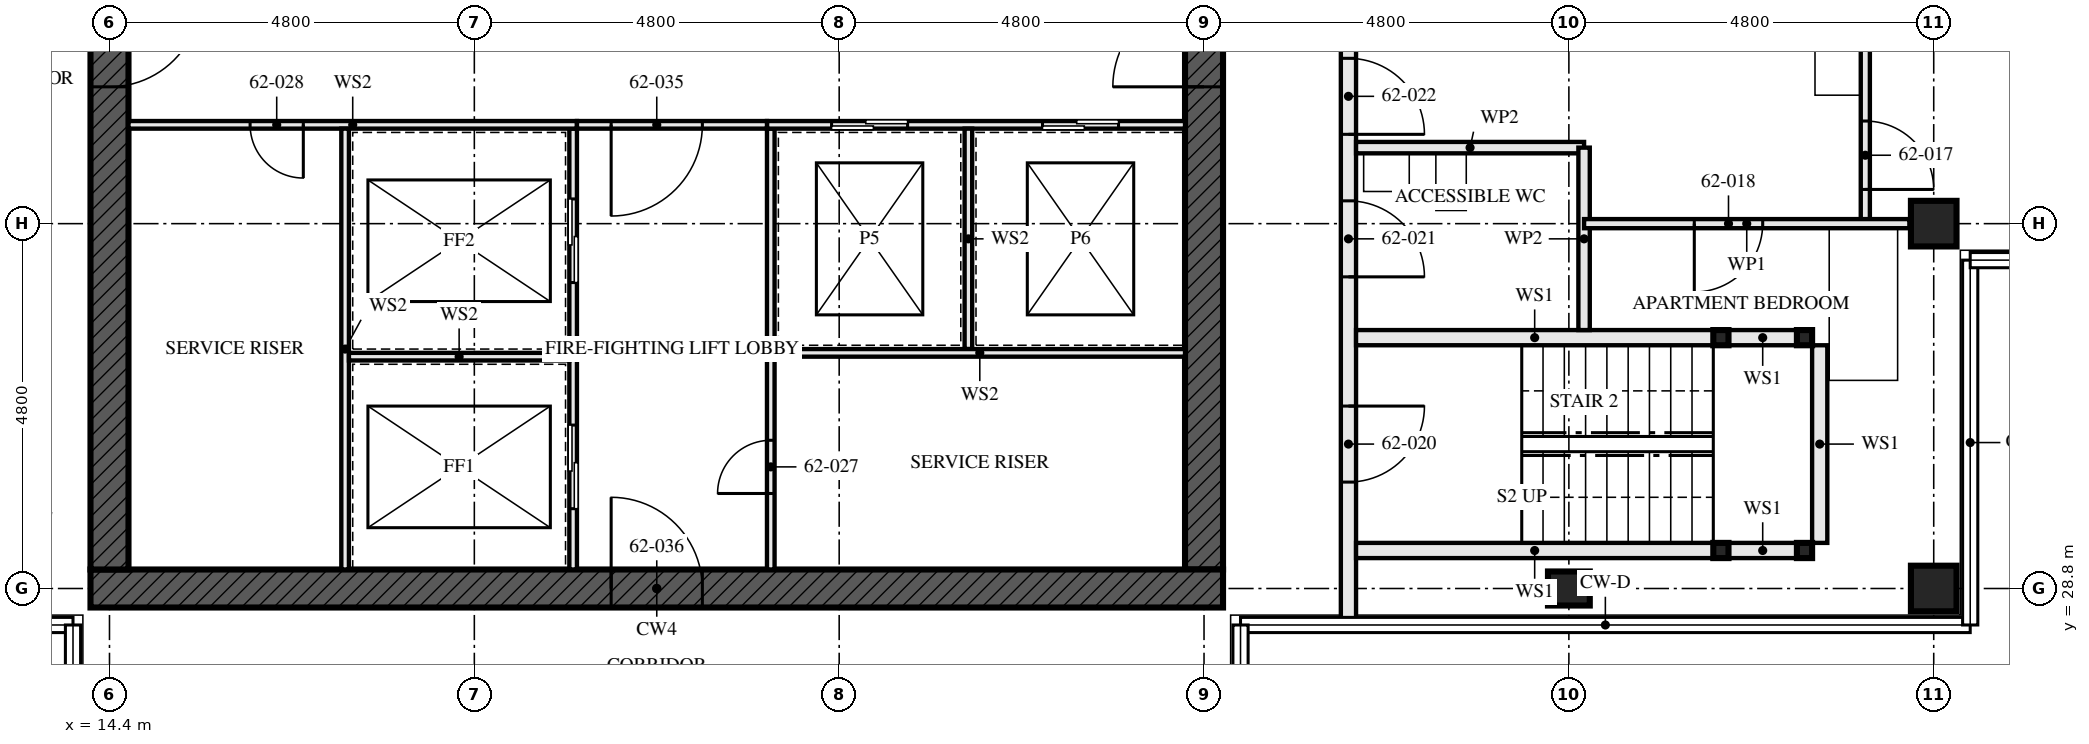
"""IFC4 building model, lengths in metres.
Left out: names, types, materials, properties, quantities, classifications, styles, units other than length and angle.
Written with IfcOpenShell. Run it as: python <this file> out.ifc"""

import sys

from ifc_helpers import new_model, si_unit, direction, frame, frame_2d, origin, origin_2d, place, context, subcontext, project, spatial, rectangle, hollow_rectangle, i_section, extrude, element, fill, save


model = new_model("IFC4")
c1 = context("Model", 3, precision=1e-05, world=origin(), true_north=direction((0.0, 1.0)))
c2 = subcontext(c1, "Body", "Model", "MODEL_VIEW")
j1 = project(units=[si_unit("LENGTHUNIT", "METRE"), si_unit("PLANEANGLEUNIT", "RADIAN")], contexts=[c1])
p1 = place(None, origin())
s1 = spatial("IfcSite", under=j1, at=p1, CompositionType="ELEMENT")
p2 = place(p1, origin())
s2 = spatial("IfcBuilding", under=s1, at=p2, CompositionType="ELEMENT")
p3 = place(p2, frame((0.0, 0.0, 226.0)))
s3 = spatial("IfcBuildingStorey", under=s2, at=p3, CompositionType="ELEMENT", Elevation=226.0)
p4 = place(p3, frame((33.6, 28.8, 0.0), z_axis=(0.0, 0.0, 1.0), x_axis=(0.0, 1.0, 0.0)))
e1 = element("IfcColumn", 1, at=p4, inside=s3, PredefinedType="COLUMN", context=c2, shape_type="SweptSolid", body=[
    extrude(i_section(OverallWidth=0.448, OverallDepth=0.55, WebThickness=0.072, FlangeThickness=0.115, FilletRadius=0.015, at=origin_2d()), origin(), (0.0, 0.0, 1.0), 3.5),
])
for number, where, z_axis, x_axis in (
    (2, (38.4, 28.8, 0.0), (0.0, 0.0, 1.0), (0.0, 1.0, 0.0)),
    (3, (38.4, 33.6, 0.0), (0.0, 0.0, 1.0), (0.0, 1.0, 0.0)),
):
    element("IfcColumn", number, at=place(p3, frame(where, z_axis=z_axis, x_axis=x_axis)), inside=s3, PredefinedType="COLUMN", context=c2, shape_type="SweptSolid", body=[
        extrude(hollow_rectangle(XDim=0.6, YDim=0.6, WallThickness=0.05, at=origin_2d()), origin(), (0.0, 0.0, 1.0), 3.5),
    ])
p5 = place(p3, frame((14.15, 28.8, -0.17), z_axis=(0.0, 0.0, 1.0), x_axis=(1.0, 0.0, 0.0)))
e4 = element("IfcWall", 4, at=p5, inside=s3, PredefinedType="SHEAR", context=c2, shape_type="SweptSolid", body=[
    extrude(rectangle(XDim=14.9, YDim=0.5, at=frame_2d((7.45, 0.0))), origin(), (0.0, 0.0, 1.0), 3.5),
])
p6 = place(p5, frame((6.85, 0.0, 0.17)))
e5 = element("IfcOpeningElement", 5, at=p6, cuts=e4, PredefinedType="OPENING", context=c2, shape_type="SweptSolid", body=[
    extrude(rectangle(XDim=1.2, YDim=2.1, at=frame_2d((0.6, 1.05))), frame((0.0, 0.26, 0.0), z_axis=(0.0, -1.0, 0.0), x_axis=(1.0, 0.0, 0.0)), (0.0, 0.0, 1.0), 0.521),
])
p7 = place(p3, frame((14.4, 42.95, -0.17), z_axis=(0.0, 0.0, 1.0), x_axis=(0.0, -1.0, 0.0)))
e6 = element("IfcWall", 6, at=p7, inside=s3, PredefinedType="SHEAR", context=c2, shape_type="SweptSolid", body=[
    extrude(rectangle(XDim=13.9, YDim=0.5, at=frame_2d((6.95, 0.0))), origin(), (0.0, 0.0, 1.0), 3.5),
])
p8 = place(p7, frame((6.35, 0.0, 0.17)))
e7 = element("IfcOpeningElement", 7, at=p8, cuts=e6, PredefinedType="OPENING", context=c2, shape_type="SweptSolid", body=[
    extrude(rectangle(XDim=1.2, YDim=2.1, at=frame_2d((0.6, 1.05))), frame((0.0, 0.26, 0.0), z_axis=(0.0, -1.0, 0.0), x_axis=(1.0, 0.0, 0.0)), (0.0, 0.0, 1.0), 0.521),
])
p9 = place(p3, frame((28.8, 29.05, -0.17), z_axis=(0.0, 0.0, 1.0), x_axis=(0.0, 1.0, 0.0)))
e8 = element("IfcWall", 8, at=p9, inside=s3, PredefinedType="SHEAR", context=c2, shape_type="SweptSolid", body=[
    extrude(rectangle(XDim=13.9, YDim=0.5, at=frame_2d((6.95, 0.0))), origin(), (0.0, 0.0, 1.0), 3.5),
])
p10 = place(p9, frame((6.35, 0.0, 0.17)))
e9 = element("IfcOpeningElement", 9, at=p10, cuts=e8, PredefinedType="OPENING", context=c2, shape_type="SweptSolid", body=[
    extrude(rectangle(XDim=1.2, YDim=2.1, at=frame_2d((0.6, 1.05))), frame((0.0, 0.26, 0.0), z_axis=(0.0, -1.0, 0.0), x_axis=(1.0, 0.0, 0.0)), (0.0, 0.0, 1.0), 0.521),
])
for number, where, z_axis, x_axis in (
    (10, (36.7, 29.3, 0.0), (0.0, 0.0, 1.0), (1.0, 0.0, 0.0)),
    (11, (36.7, 32.1, 0.0), (0.0, 0.0, 1.0), (1.0, 0.0, 0.0)),
    (12, (35.6, 29.3, 0.0), (0.0, 0.0, 1.0), (1.0, 0.0, 0.0)),
    (13, (35.6, 32.1, 0.0), (0.0, 0.0, 1.0), (1.0, 0.0, 0.0)),
):
    element("IfcColumn", number, at=place(p3, frame(where, z_axis=z_axis, x_axis=x_axis)), inside=s3, PredefinedType="COLUMN", context=c2, shape_type="SweptSolid", body=[
        extrude(hollow_rectangle(XDim=0.2, YDim=0.2, WallThickness=0.008, at=origin_2d()), origin(), (0.0, 0.0, 1.0), 3.33),
    ])
p11 = place(p3, frame((36.6, 29.3, 0.0), z_axis=(0.0, 0.0, 1.0), x_axis=(-1.0, 0.0, 0.0)))
e14 = element("IfcWall", 14, at=p11, inside=s3, PredefinedType="SOLIDWALL", context=c2, shape_type="SweptSolid", body=[
    extrude(rectangle(XDim=0.9, YDim=0.2, at=frame_2d((0.45, 0.0))), origin(), (0.0, 0.0, 1.0), 2.99),
])
p12 = place(p3, frame((35.5, 29.3, 0.0), z_axis=(0.0, 0.0, 1.0), x_axis=(-1.0, 0.0, 0.0)))
e15 = element("IfcWall", 15, at=p12, inside=s3, PredefinedType="SOLIDWALL", context=c2, shape_type="SweptSolid", body=[
    extrude(rectangle(XDim=4.7, YDim=0.2, at=frame_2d((2.35, 0.0))), origin(), (0.0, 0.0, 1.0), 2.99),
])
p13 = place(p3, frame((36.6, 32.1, 0.0), z_axis=(0.0, 0.0, 1.0), x_axis=(-1.0, 0.0, 0.0)))
e16 = element("IfcWall", 16, at=p13, inside=s3, PredefinedType="SOLIDWALL", context=c2, shape_type="SweptSolid", body=[
    extrude(rectangle(XDim=0.9, YDim=0.2, at=frame_2d((0.45, 0.0))), origin(), (0.0, 0.0, 1.0), 2.99),
])
p14 = place(p3, frame((35.5, 32.1, 0.0), z_axis=(0.0, 0.0, 1.0), x_axis=(-1.0, 0.0, 0.0)))
e17 = element("IfcWall", 17, at=p14, inside=s3, PredefinedType="SOLIDWALL", context=c2, shape_type="SweptSolid", body=[
    extrude(rectangle(XDim=4.7, YDim=0.2, at=frame_2d((2.35, 0.0))), origin(), (0.0, 0.0, 1.0), 2.99),
])
p15 = place(p3, frame((36.9, 29.4, 0.0), z_axis=(0.0, 0.0, 1.0), x_axis=(0.0, 1.0, 0.0)))
e18 = element("IfcWall", 18, at=p15, inside=s3, PredefinedType="SOLIDWALL", context=c2, shape_type="SweptSolid", body=[
    extrude(rectangle(XDim=2.6, YDim=0.2, at=frame_2d((1.3, 0.0))), origin(), (0.0, 0.0, 1.0), 3.33),
])
p16 = place(p3, frame((33.8, 32.2, 0.0), z_axis=(0.0, 0.0, 1.0), x_axis=(0.0, 1.0, 0.0)))
e19 = element("IfcWall", 19, at=p16, inside=s3, PredefinedType="PARTITIONING", context=c2, shape_type="SweptSolid", body=[
    extrude(rectangle(XDim=2.4, YDim=0.15, at=frame_2d((1.2, 0.0))), origin(), (0.0, 0.0, 1.0), 2.55),
])
p17 = place(p3, frame((33.8, 34.6, 0.0), z_axis=(0.0, 0.0, 1.0), x_axis=(-1.0, 0.0, 0.0)))
e20 = element("IfcWall", 20, at=p17, inside=s3, PredefinedType="PARTITIONING", context=c2, shape_type="SweptSolid", body=[
    extrude(rectangle(XDim=3.0, YDim=0.15, at=frame_2d((1.5, 0.0))), origin(), (0.0, 0.0, 1.0), 3.33),
])
p18 = place(p3, frame((37.5, 33.6, 0.0), z_axis=(0.0, 0.0, 1.0), x_axis=(0.0, 1.0, 0.0)))
e21 = element("IfcWall", 21, at=p18, inside=s3, PredefinedType="PARTITIONING", context=c2, shape_type="SweptSolid", body=[
    extrude(rectangle(XDim=4.8, YDim=0.12, at=frame_2d((2.4, 0.0))), origin(), (0.0, 0.0, 1.0), 3.33),
])
p19 = place(p18, frame((0.45, 0.0, 0.0)))
e22 = element("IfcOpeningElement", 22, at=p19, cuts=e21, PredefinedType="OPENING", context=c2, shape_type="SweptSolid", body=[
    extrude(rectangle(XDim=0.9, YDim=2.1, at=frame_2d((0.45, 1.05))), frame((0.0, 0.071, 0.0), z_axis=(0.0, -1.0, 0.0), x_axis=(1.0, 0.0, 0.0)), (0.0, 0.0, 1.0), 0.141),
])
p20 = place(p3, frame((38.08, 33.6, 0.0), z_axis=(0.0, 0.0, 1.0), x_axis=(-1.0, 0.0, 0.0)))
e23 = element("IfcWall", 23, at=p20, inside=s3, PredefinedType="PARTITIONING", context=c2, shape_type="SweptSolid", body=[
    extrude(rectangle(XDim=4.28, YDim=0.12, at=frame_2d((2.14, 0.0))), origin(), (0.0, 0.0, 1.0), 2.55),
])
p21 = place(p20, frame((1.93, 0.0, 0.0)))
e24 = element("IfcOpeningElement", 24, at=p21, cuts=e23, PredefinedType="OPENING", context=c2, shape_type="SweptSolid", body=[
    extrude(rectangle(XDim=0.9, YDim=2.1, at=frame_2d((0.45, 1.05))), frame((0.0, 0.071, 0.0), z_axis=(0.0, -1.0, 0.0), x_axis=(1.0, 0.0, 0.0)), (0.0, 0.0, 1.0), 0.141),
])
p22 = place(p3, frame((30.7, 28.345, 0.0), z_axis=(0.0, 0.0, 1.0), x_axis=(0.0, 1.0, 0.0)))
e25 = element("IfcWall", 25, at=p22, inside=s3, PredefinedType="PARTITIONING", context=c2, shape_type="SweptSolid", body=[
    extrude(rectangle(XDim=15.31, YDim=0.2, at=frame_2d((7.655, 0.0))), origin(), (0.0, 0.0, 1.0), 2.32),
])
p23 = place(p22, frame((1.855, 0.0, 0.0)))
e26 = element("IfcOpeningElement", 26, at=p23, cuts=e25, PredefinedType="OPENING", context=c2, shape_type="SweptSolid", body=[
    extrude(rectangle(XDim=1.0, YDim=2.1, at=frame_2d((0.5, 1.05))), frame((0.0, 0.111, 0.0), z_axis=(0.0, -1.0, 0.0), x_axis=(1.0, 0.0, 0.0)), (0.0, 0.0, 1.0), 0.221),
])
p24 = place(p22, frame((4.555, 0.0, 0.0)))
e27 = element("IfcOpeningElement", 27, at=p24, cuts=e25, PredefinedType="OPENING", context=c2, shape_type="SweptSolid", body=[
    extrude(rectangle(XDim=1.0, YDim=2.1, at=frame_2d((0.5, 1.05))), frame((0.0, 0.111, 0.0), z_axis=(0.0, -1.0, 0.0), x_axis=(1.0, 0.0, 0.0)), (0.0, 0.0, 1.0), 0.221),
])
p25 = place(p22, frame((6.43, 0.0, 0.0)))
e28 = element("IfcOpeningElement", 28, at=p25, cuts=e25, PredefinedType="OPENING", context=c2, shape_type="SweptSolid", body=[
    extrude(rectangle(XDim=1.0, YDim=2.1, at=frame_2d((0.5, 1.05))), frame((0.0, 0.111, 0.0), z_axis=(0.0, -1.0, 0.0), x_axis=(1.0, 0.0, 0.0)), (0.0, 0.0, 1.0), 0.221),
])
p26 = place(p3, frame((20.5, 29.05, 0.0), z_axis=(0.0, 0.0, 1.0), x_axis=(0.0, 1.0, 0.0)))
e29 = element("IfcWall", 29, at=p26, inside=s3, PredefinedType="SOLIDWALL", context=c2, shape_type="SweptSolid", body=[
    extrude(rectangle(XDim=5.8, YDim=0.1, at=frame_2d((2.9, 0.0))), origin(), (0.0, 0.0, 1.0), 3.33),
])
p27 = place(p26, frame((0.8, 0.0, 0.0)))
e30 = element("IfcOpeningElement", 30, at=p27, cuts=e29, PredefinedType="OPENING", context=c2, shape_type="SweptSolid", body=[
    extrude(rectangle(XDim=1.1, YDim=2.3, at=frame_2d((0.55, 1.15))), frame((0.0, 0.061, 0.0), z_axis=(0.0, -1.0, 0.0), x_axis=(1.0, 0.0, 0.0)), (0.0, 0.0, 1.0), 0.121),
])
p28 = place(p26, frame((3.775, 0.0, 0.0)))
e31 = element("IfcOpeningElement", 31, at=p28, cuts=e29, PredefinedType="OPENING", context=c2, shape_type="SweptSolid", body=[
    extrude(rectangle(XDim=1.1, YDim=2.3, at=frame_2d((0.55, 1.15))), frame((0.0, 0.061, 0.0), z_axis=(0.0, -1.0, 0.0), x_axis=(1.0, 0.0, 0.0)), (0.0, 0.0, 1.0), 0.121),
])
p29 = place(p3, frame((23.1, 29.05, 0.0), z_axis=(0.0, 0.0, 1.0), x_axis=(0.0, 1.0, 0.0)))
e32 = element("IfcWall", 32, at=p29, inside=s3, PredefinedType="SOLIDWALL", context=c2, shape_type="SweptSolid", body=[
    extrude(rectangle(XDim=5.8, YDim=0.1, at=frame_2d((2.9, 0.0))), origin(), (0.0, 0.0, 1.0), 3.33),
])
p30 = place(p29, frame((1.0, 0.0, 0.0)))
e33 = element("IfcOpeningElement", 33, at=p30, cuts=e32, PredefinedType="OPENING", context=c2, shape_type="SweptSolid", body=[
    extrude(rectangle(XDim=0.7, YDim=2.1, at=frame_2d((0.35, 1.05))), frame((0.0, 0.061, 0.0), z_axis=(0.0, -1.0, 0.0), x_axis=(1.0, 0.0, 0.0)), (0.0, 0.0, 1.0), 0.121),
])
p31 = place(p3, frame((14.65, 34.9, 0.0), z_axis=(0.0, 0.0, 1.0), x_axis=(1.0, 0.0, 0.0)))
e34 = element("IfcWall", 34, at=p31, inside=s3, PredefinedType="SOLIDWALL", context=c2, shape_type="SweptSolid", body=[
    extrude(rectangle(XDim=5.9, YDim=0.1, at=frame_2d((2.95, 0.0))), origin(), (0.0, 0.0, 1.0), 3.33),
])
p32 = place(p31, frame((1.6, 0.0, 0.0)))
e35 = element("IfcOpeningElement", 35, at=p32, cuts=e34, PredefinedType="OPENING", context=c2, shape_type="SweptSolid", body=[
    extrude(rectangle(XDim=0.7, YDim=2.1, at=frame_2d((0.35, 1.05))), frame((0.0, 0.061, 0.0), z_axis=(0.0, -1.0, 0.0), x_axis=(1.0, 0.0, 0.0)), (0.0, 0.0, 1.0), 0.121),
])
p33 = place(p3, frame((23.05, 34.9, 0.0), z_axis=(0.0, 0.0, 1.0), x_axis=(1.0, 0.0, 0.0)))
e36 = element("IfcWall", 36, at=p33, inside=s3, PredefinedType="SOLIDWALL", context=c2, shape_type="SweptSolid", body=[
    extrude(rectangle(XDim=5.5, YDim=0.1, at=frame_2d((2.75, 0.0))), origin(), (0.0, 0.0, 1.0), 3.33),
])
p34 = place(p33, frame((0.85, 0.0, 0.0)))
e37 = element("IfcOpeningElement", 37, at=p34, cuts=e36, PredefinedType="OPENING", context=c2, shape_type="SweptSolid", body=[
    extrude(rectangle(XDim=1.0, YDim=2.1, at=frame_2d((0.5, 1.05))), frame((0.0, 0.061, 0.0), z_axis=(0.0, -1.0, 0.0), x_axis=(1.0, 0.0, 0.0)), (0.0, 0.0, 1.0), 0.121),
])
p35 = place(p33, frame((3.625, 0.0, 0.0)))
e38 = element("IfcOpeningElement", 38, at=p35, cuts=e36, PredefinedType="OPENING", context=c2, shape_type="SweptSolid", body=[
    extrude(rectangle(XDim=1.0, YDim=2.1, at=frame_2d((0.5, 1.05))), frame((0.0, 0.061, 0.0), z_axis=(0.0, -1.0, 0.0), x_axis=(1.0, 0.0, 0.0)), (0.0, 0.0, 1.0), 0.121),
])
p36 = place(p3, frame((20.55, 34.9, 0.0), z_axis=(0.0, 0.0, 1.0), x_axis=(1.0, 0.0, 0.0)))
e39 = element("IfcWall", 39, at=p36, inside=s3, PredefinedType="SOLIDWALL", context=c2, shape_type="SweptSolid", body=[
    extrude(rectangle(XDim=2.5, YDim=0.1, at=frame_2d((1.25, 0.0))), origin(), (0.0, 0.0, 1.0), 3.33),
])
p37 = place(p36, frame((0.45, 0.0, 0.0)))
e40 = element("IfcOpeningElement", 40, at=p37, cuts=e39, PredefinedType="OPENING", context=c2, shape_type="SweptSolid", body=[
    extrude(rectangle(XDim=1.2, YDim=2.1, at=frame_2d((0.6, 1.05))), frame((0.0, 0.061, 0.0), z_axis=(0.0, -1.0, 0.0), x_axis=(1.0, 0.0, 0.0)), (0.0, 0.0, 1.0), 0.121),
])
p38 = place(p3, frame((17.5, 29.05, 0.0), z_axis=(0.0, 0.0, 1.0), x_axis=(0.0, 1.0, 0.0)))
e41 = element("IfcWall", 41, at=p38, inside=s3, PredefinedType="SOLIDWALL", context=c2, shape_type="SweptSolid", body=[
    extrude(rectangle(XDim=5.8, YDim=0.1, at=frame_2d((2.9, 0.0))), origin(), (0.0, 0.0, 1.0), 3.33),
])
p39 = place(p3, frame((17.55, 31.85, 0.0), z_axis=(0.0, 0.0, 1.0), x_axis=(1.0, 0.0, 0.0)))
e42 = element("IfcWall", 42, at=p39, inside=s3, PredefinedType="SOLIDWALL", context=c2, shape_type="SweptSolid", body=[
    extrude(rectangle(XDim=2.9, YDim=0.1, at=frame_2d((1.45, 0.0))), origin(), (0.0, 0.0, 1.0), 3.33),
])
p40 = place(p3, frame((25.7, 31.95, 0.0), z_axis=(0.0, 0.0, 1.0), x_axis=(0.0, 1.0, 0.0)))
e43 = element("IfcWall", 43, at=p40, inside=s3, PredefinedType="SOLIDWALL", context=c2, shape_type="SweptSolid", body=[
    extrude(rectangle(XDim=2.9, YDim=0.1, at=frame_2d((1.45, 0.0))), origin(), (0.0, 0.0, 1.0), 3.33),
])
p41 = place(p3, frame((23.15, 31.9, 0.0), z_axis=(0.0, 0.0, 1.0), x_axis=(1.0, 0.0, 0.0)))
e44 = element("IfcWall", 44, at=p41, inside=s3, PredefinedType="SOLIDWALL", context=c2, shape_type="SweptSolid", body=[
    extrude(rectangle(XDim=5.4, YDim=0.1, at=frame_2d((2.7, 0.0))), origin(), (0.0, 0.0, 1.0), 3.33),
])
p42 = place(p19, frame((0.9, 0.0, 0.0), z_axis=(0.0, 0.0, 1.0), x_axis=(-1.0, 0.0, 0.0)))
e45 = element("IfcDoor", 45, at=p42, inside=s3, OperationType="SINGLE_SWING_LEFT", PredefinedType="DOOR", context=c2, shape_type="SweptSolid", body=[
    extrude(rectangle(XDim=0.9, YDim=2.1, at=frame_2d((0.45, 1.05))), frame((0.0, 0.022, 0.0), z_axis=(0.0, -1.0, 0.0), x_axis=(1.0, 0.0, 0.0)), (0.0, 0.0, 1.0), 0.044),
])
fill(e22, e45)
p43 = place(p21, origin())
e46 = element("IfcDoor", 46, at=p43, inside=s3, OperationType="SINGLE_SWING_LEFT", PredefinedType="DOOR", context=c2, shape_type="SweptSolid", body=[
    extrude(rectangle(XDim=0.9, YDim=2.1, at=frame_2d((0.45, 1.05))), frame((0.0, 0.022, 0.0), z_axis=(0.0, -1.0, 0.0), x_axis=(1.0, 0.0, 0.0)), (0.0, 0.0, 1.0), 0.044),
])
fill(e24, e46)
p44 = place(p23, frame((1.0, 0.0, 0.0), z_axis=(0.0, 0.0, 1.0), x_axis=(-1.0, 0.0, 0.0)))
e47 = element("IfcDoor", 47, at=p44, inside=s3, OperationType="SINGLE_SWING_RIGHT", PredefinedType="DOOR", context=c2, shape_type="SweptSolid", body=[
    extrude(rectangle(XDim=1.0, YDim=2.1, at=frame_2d((0.5, 1.05))), frame((0.0, 0.032, 0.0), z_axis=(0.0, -1.0, 0.0), x_axis=(1.0, 0.0, 0.0)), (0.0, 0.0, 1.0), 0.064),
])
fill(e26, e47)
p45 = place(p24, frame((1.0, 0.0, 0.0), z_axis=(0.0, 0.0, 1.0), x_axis=(-1.0, 0.0, 0.0)))
e48 = element("IfcDoor", 48, at=p45, inside=s3, OperationType="SINGLE_SWING_LEFT", PredefinedType="DOOR", context=c2, shape_type="SweptSolid", body=[
    extrude(rectangle(XDim=1.0, YDim=2.1, at=frame_2d((0.5, 1.05))), frame((0.0, 0.027, 0.0), z_axis=(0.0, -1.0, 0.0), x_axis=(1.0, 0.0, 0.0)), (0.0, 0.0, 1.0), 0.054),
])
fill(e27, e48)
p46 = place(p25, frame((1.0, 0.0, 0.0), z_axis=(0.0, 0.0, 1.0), x_axis=(-1.0, 0.0, 0.0)))
e49 = element("IfcDoor", 49, at=p46, inside=s3, OperationType="SINGLE_SWING_LEFT", PredefinedType="DOOR", context=c2, shape_type="SweptSolid", body=[
    extrude(rectangle(XDim=1.0, YDim=2.1, at=frame_2d((0.5, 1.05))), frame((0.0, 0.027, 0.0), z_axis=(0.0, -1.0, 0.0), x_axis=(1.0, 0.0, 0.0)), (0.0, 0.0, 1.0), 0.054),
])
fill(e28, e49)
p47 = place(p27, origin())
e50 = element("IfcDoor", 50, at=p47, inside=s3, OperationType="SLIDING_TO_LEFT", PredefinedType="DOOR", context=c2, shape_type="SweptSolid", body=[
    extrude(rectangle(XDim=1.1, YDim=2.3, at=frame_2d((0.55, 1.15))), frame((0.0, 0.05, 0.0), z_axis=(0.0, -1.0, 0.0), x_axis=(1.0, 0.0, 0.0)), (0.0, 0.0, 1.0), 0.1),
])
fill(e30, e50)
p48 = place(p28, origin())
e51 = element("IfcDoor", 51, at=p48, inside=s3, OperationType="SLIDING_TO_LEFT", PredefinedType="DOOR", context=c2, shape_type="SweptSolid", body=[
    extrude(rectangle(XDim=1.1, YDim=2.3, at=frame_2d((0.55, 1.15))), frame((0.0, 0.05, 0.0), z_axis=(0.0, -1.0, 0.0), x_axis=(1.0, 0.0, 0.0)), (0.0, 0.0, 1.0), 0.1),
])
fill(e31, e51)
p49 = place(p30, origin())
e52 = element("IfcDoor", 52, at=p49, inside=s3, OperationType="SINGLE_SWING_RIGHT", PredefinedType="DOOR", context=c2, shape_type="SweptSolid", body=[
    extrude(rectangle(XDim=0.7, YDim=2.1, at=frame_2d((0.35, 1.05))), frame((0.0, 0.027, 0.0), z_axis=(0.0, -1.0, 0.0), x_axis=(1.0, 0.0, 0.0)), (0.0, 0.0, 1.0), 0.054),
])
fill(e33, e52)
p50 = place(p32, frame((0.7, 0.0, 0.0), z_axis=(0.0, 0.0, 1.0), x_axis=(-1.0, 0.0, 0.0)))
e53 = element("IfcDoor", 53, at=p50, inside=s3, OperationType="SINGLE_SWING_RIGHT", PredefinedType="DOOR", context=c2, shape_type="SweptSolid", body=[
    extrude(rectangle(XDim=0.7, YDim=2.1, at=frame_2d((0.35, 1.05))), frame((0.0, 0.027, 0.0), z_axis=(0.0, -1.0, 0.0), x_axis=(1.0, 0.0, 0.0)), (0.0, 0.0, 1.0), 0.054),
])
fill(e35, e53)
p51 = place(p34, origin())
e54 = element("IfcDoor", 54, at=p51, inside=s3, OperationType="SLIDING_TO_LEFT", PredefinedType="DOOR", context=c2, shape_type="SweptSolid", body=[
    extrude(rectangle(XDim=1.0, YDim=2.1, at=frame_2d((0.5, 1.05))), frame((0.0, 0.05, 0.0), z_axis=(0.0, -1.0, 0.0), x_axis=(1.0, 0.0, 0.0)), (0.0, 0.0, 1.0), 0.1),
])
fill(e37, e54)
p52 = place(p35, origin())
e55 = element("IfcDoor", 55, at=p52, inside=s3, OperationType="SLIDING_TO_LEFT", PredefinedType="DOOR", context=c2, shape_type="SweptSolid", body=[
    extrude(rectangle(XDim=1.0, YDim=2.1, at=frame_2d((0.5, 1.05))), frame((0.0, 0.05, 0.0), z_axis=(0.0, -1.0, 0.0), x_axis=(1.0, 0.0, 0.0)), (0.0, 0.0, 1.0), 0.1),
])
fill(e38, e55)
p53 = place(p37, frame((1.2, 0.0, 0.0), z_axis=(0.0, 0.0, 1.0), x_axis=(-1.0, 0.0, 0.0)))
e56 = element("IfcDoor", 56, at=p53, inside=s3, OperationType="SINGLE_SWING_LEFT", PredefinedType="DOOR", context=c2, shape_type="SweptSolid", body=[
    extrude(rectangle(XDim=1.2, YDim=2.1, at=frame_2d((0.6, 1.05))), frame((0.0, 0.027, 0.0), z_axis=(0.0, -1.0, 0.0), x_axis=(1.0, 0.0, 0.0)), (0.0, 0.0, 1.0), 0.054),
])
fill(e40, e56)
p54 = place(p6, origin())
e57 = element("IfcDoor", 57, at=p54, inside=s3, OperationType="SINGLE_SWING_LEFT", PredefinedType="DOOR", context=c2, shape_type="SweptSolid", body=[
    extrude(rectangle(XDim=1.2, YDim=2.1, at=frame_2d((0.6, 1.05))), frame((0.0, 0.027, 0.0), z_axis=(0.0, -1.0, 0.0), x_axis=(1.0, 0.0, 0.0)), (0.0, 0.0, 1.0), 0.054),
])
fill(e5, e57)
p55 = place(p8, origin())
e58 = element("IfcDoor", 58, at=p55, inside=s3, OperationType="SINGLE_SWING_LEFT", PredefinedType="DOOR", context=c2, shape_type="SweptSolid", body=[
    extrude(rectangle(XDim=1.2, YDim=2.1, at=frame_2d((0.6, 1.05))), frame((0.0, 0.027, 0.0), z_axis=(0.0, -1.0, 0.0), x_axis=(1.0, 0.0, 0.0)), (0.0, 0.0, 1.0), 0.054),
])
fill(e7, e58)
p56 = place(p10, origin())
e59 = element("IfcDoor", 59, at=p56, inside=s3, OperationType="SINGLE_SWING_LEFT", PredefinedType="DOOR", context=c2, shape_type="SweptSolid", body=[
    extrude(rectangle(XDim=1.2, YDim=2.1, at=frame_2d((0.6, 1.05))), frame((0.0, 0.027, 0.0), z_axis=(0.0, -1.0, 0.0), x_axis=(1.0, 0.0, 0.0)), (0.0, 0.0, 1.0), 0.054),
])
fill(e9, e59)
save(model, sys.argv[1])
